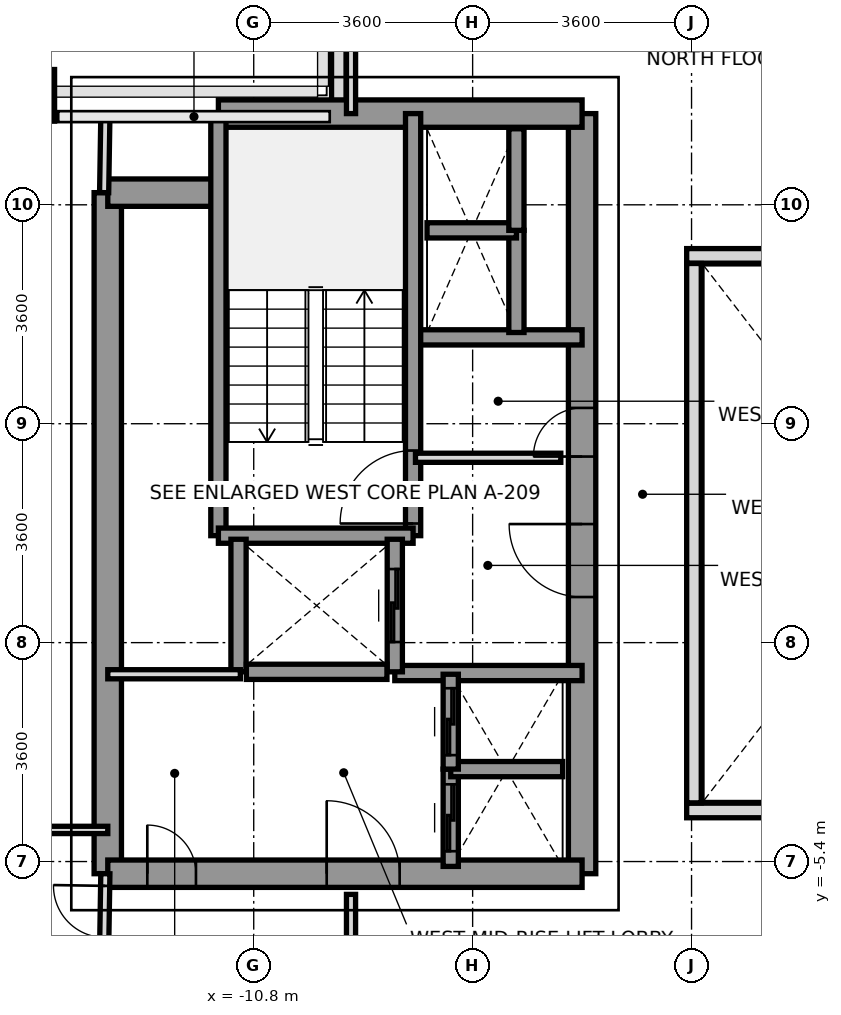
"""IFC4 building model, lengths in metres.
Left out: names, types, materials, properties, quantities, classifications, styles, units other than length and angle.
Written with IfcOpenShell. Run it as: python <this file> out.ifc"""

import sys

from ifc_helpers import new_model, si_unit, direction, frame, frame_2d, origin, origin_2d, place, context, subcontext, project, spatial, rectangle, extrude, source, transform, mapped, element, fill, save


model = new_model("IFC4")
c1 = context("Model", 3, precision=1e-05, world=origin(), true_north=direction((0.0, 1.0)))
c2 = subcontext(c1, "Body", "Model", "MODEL_VIEW")
j1 = project(units=[si_unit("LENGTHUNIT", "METRE"), si_unit("PLANEANGLEUNIT", "RADIAN")], contexts=[c1])
p1 = place(None, origin())
s1 = spatial("IfcSite", under=j1, at=p1, CompositionType="ELEMENT")
p2 = place(p1, origin())
s2 = spatial("IfcBuilding", under=s1, at=p2, CompositionType="ELEMENT")
p3 = place(p2, frame((0.0, 0.0, 144.8)))
s3 = spatial("IfcBuildingStorey", under=s2, at=p3, CompositionType="ELEMENT", Elevation=144.8)
m1 = source(origin(), c2, "Body", "SweptSolid", [
    extrude(rectangle(XDim=0.65, YDim=0.85, at=origin_2d()), origin(), (0.0, 0.0, 1.0), 3.2),
])
p4 = place(p3, frame((-14.4, 7.2, 0.0), z_axis=(0.0, 0.0, 1.0), x_axis=(1.0, 0.0, 0.0)))
e1 = element("IfcColumn", 1, at=p4, inside=s3, PredefinedType="COLUMN", context=c2, shape_type="MappedRepresentation", body=[
    mapped(m1, transform((0.0, 0.0, 0.0), x_axis=(1.0, 0.0, 0.0), y_axis=(0.0, 1.0, 0.0), z_axis=(0.0, 0.0, 1.0), scale=1.0)),
])
p5 = place(p3, frame((-9.4, 6.953, 0.0), z_axis=(0.0, 0.0, 1.0), x_axis=(0.0, 1.0, 0.0)))
e2 = element("IfcWall", 2, at=p5, inside=s3, PredefinedType="PARAPET", context=c2, shape_type="SweptSolid", body=[
    extrude(rectangle(XDim=1.519, YDim=0.24, at=frame_2d((0.76, 0.0))), origin(), (0.0, 0.0, 1.0), 1.15),
])
p6 = place(p3, frame((-13.2, -5.6, 0.0), z_axis=(0.0, 0.0, 1.0), x_axis=(0.0, 1.0, 0.0)))
e3 = element("IfcWall", 3, at=p6, inside=s3, PredefinedType="SHEAR", context=c2, shape_type="SweptSolid", body=[
    extrude(rectangle(XDim=11.2, YDim=0.45, at=frame_2d((5.6, 0.0))), origin(), (0.0, 0.0, 1.0), 3.2),
])
p7 = place(p3, frame((-5.4, -5.6, 0.0), z_axis=(0.0, 0.0, 1.0), x_axis=(0.0, 1.0, 0.0)))
e4 = element("IfcWall", 4, at=p7, inside=s3, PredefinedType="SHEAR", context=c2, shape_type="SweptSolid", body=[
    extrude(rectangle(XDim=12.5, YDim=0.45, at=frame_2d((6.25, 0.0))), origin(), (0.0, 0.0, 1.0), 3.2),
])
p8 = place(p7, frame((4.55, 0.0, 0.0)))
e5 = element("IfcOpeningElement", 5, at=p8, cuts=e4, PredefinedType="OPENING", context=c2, shape_type="SweptSolid", body=[
    extrude(rectangle(XDim=1.2, YDim=2.2, at=frame_2d((0.6, 1.1))), frame((0.0, 0.235, 0.0), z_axis=(0.0, -1.0, 0.0), x_axis=(1.0, 0.0, 0.0)), (0.0, 0.0, 1.0), 0.47),
])
p9 = place(p7, frame((6.86, 0.0, 0.0)))
e6 = element("IfcOpeningElement", 6, at=p9, cuts=e4, PredefinedType="OPENING", context=c2, shape_type="SweptSolid", body=[
    extrude(rectangle(XDim=0.8, YDim=2.1, at=frame_2d((0.4, 1.05))), frame((0.0, 0.235, 0.0), z_axis=(0.0, -1.0, 0.0), x_axis=(1.0, 0.0, 0.0)), (0.0, 0.0, 1.0), 0.47),
])
p10 = place(p3, frame((-11.381, 6.9, 0.0), z_axis=(0.0, 0.0, 1.0), x_axis=(1.0, 0.0, 0.0)))
e7 = element("IfcWall", 7, at=p10, inside=s3, PredefinedType="SHEAR", context=c2, shape_type="SweptSolid", body=[
    extrude(rectangle(XDim=5.981, YDim=0.45, at=frame_2d((2.991, 0.0))), origin(), (0.0, 0.0, 1.0), 3.2),
])
p11 = place(p3, frame((-13.2, 5.6, 0.0), z_axis=(0.0, 0.0, 1.0), x_axis=(1.0, 0.0, 0.0)))
e8 = element("IfcWall", 8, at=p11, inside=s3, PredefinedType="SHEAR", context=c2, shape_type="SweptSolid", body=[
    extrude(rectangle(XDim=1.819, YDim=0.45, at=frame_2d((0.909, 0.0))), origin(), (0.0, 0.0, 1.0), 3.2),
])
p12 = place(p3, frame((-13.2, -5.6, 0.0), z_axis=(0.0, 0.0, 1.0), x_axis=(1.0, 0.0, 0.0)))
e9 = element("IfcWall", 9, at=p12, inside=s3, PredefinedType="SHEAR", context=c2, shape_type="SweptSolid", body=[
    extrude(rectangle(XDim=7.8, YDim=0.45, at=frame_2d((3.9, 0.0))), origin(), (0.0, 0.0, 1.0), 3.2),
])
p13 = place(p12, frame((3.6, 0.0, 0.0)))
e10 = element("IfcOpeningElement", 10, at=p13, cuts=e9, PredefinedType="OPENING", context=c2, shape_type="SweptSolid", body=[
    extrude(rectangle(XDim=1.2, YDim=2.2, at=frame_2d((0.6, 1.1))), frame((0.0, 0.235, 0.0), z_axis=(0.0, -1.0, 0.0), x_axis=(1.0, 0.0, 0.0)), (0.0, 0.0, 1.0), 0.47),
])
p14 = place(p12, frame((0.65, 0.0, 0.0)))
e11 = element("IfcOpeningElement", 11, at=p14, cuts=e9, PredefinedType="OPENING", context=c2, shape_type="SweptSolid", body=[
    extrude(rectangle(XDim=0.8, YDim=2.1, at=frame_2d((0.4, 1.05))), frame((0.0, 0.235, 0.0), z_axis=(0.0, -1.0, 0.0), x_axis=(1.0, 0.0, 0.0)), (0.0, 0.0, 1.0), 0.47),
])
p15 = place(p3, frame((-8.18, 3.22, 0.0), z_axis=(0.0, 0.0, 1.0), x_axis=(1.0, 0.0, 0.0)))
e12 = element("IfcWall", 12, at=p15, inside=s3, PredefinedType="SOLIDWALL", context=c2, shape_type="SweptSolid", body=[
    extrude(rectangle(XDim=2.78, YDim=0.25, at=frame_2d((1.39, 0.0))), origin(), (0.0, 0.0, 1.0), 3.2),
])
p16 = place(p3, frame((-8.48, -2.3, 0.0), z_axis=(0.0, 0.0, 1.0), x_axis=(1.0, 0.0, 0.0)))
e13 = element("IfcWall", 13, at=p16, inside=s3, PredefinedType="SOLIDWALL", context=c2, shape_type="SweptSolid", body=[
    extrude(rectangle(XDim=3.08, YDim=0.25, at=frame_2d((1.54, 0.0))), origin(), (0.0, 0.0, 1.0), 3.2),
])
p17 = place(p3, frame((-8.179, -0.041, 0.0), z_axis=(0.0, 0.0, 1.0), x_axis=(0.0, 1.0, 0.0)))
e14 = element("IfcWall", 14, at=p17, inside=s3, PredefinedType="SOLIDWALL", context=c2, shape_type="SweptSolid", body=[
    extrude(rectangle(XDim=6.941, YDim=0.25, at=frame_2d((3.47, 0.0))), origin(), (0.0, 0.0, 1.0), 3.2),
])
p18 = place(p17, frame((0.2, 0.0, 0.0)))
e15 = element("IfcOpeningElement", 15, at=p18, cuts=e14, PredefinedType="OPENING", context=c2, shape_type="SweptSolid", body=[
    extrude(rectangle(XDim=1.2, YDim=2.2, at=frame_2d((0.6, 1.1))), frame((0.0, 0.135, 0.0), z_axis=(0.0, -1.0, 0.0), x_axis=(1.0, 0.0, 0.0)), (0.0, 0.0, 1.0), 0.27),
])
p19 = place(p3, frame((-11.381, -0.041, 0.0), z_axis=(0.0, 0.0, 1.0), x_axis=(0.0, 1.0, 0.0)))
e16 = element("IfcWall", 16, at=p19, inside=s3, PredefinedType="SOLIDWALL", context=c2, shape_type="SweptSolid", body=[
    extrude(rectangle(XDim=6.941, YDim=0.25, at=frame_2d((3.47, 0.0))), origin(), (0.0, 0.0, 1.0), 3.2),
])
p20 = place(p3, frame((-11.381, -0.041, 0.0), z_axis=(0.0, 0.0, 1.0), x_axis=(1.0, 0.0, 0.0)))
e17 = element("IfcWall", 17, at=p20, inside=s3, PredefinedType="SOLIDWALL", context=c2, shape_type="SweptSolid", body=[
    extrude(rectangle(XDim=3.202, YDim=0.25, at=frame_2d((1.601, 0.0))), origin(), (0.0, 0.0, 1.0), 3.2),
])
p21 = place(p3, frame((-11.05, -2.28, 0.0), z_axis=(0.0, 0.0, 1.0), x_axis=(0.0, 1.0, 0.0)))
e18 = element("IfcWall", 18, at=p21, inside=s3, PredefinedType="SOLIDWALL", context=c2, shape_type="SweptSolid", body=[
    extrude(rectangle(XDim=2.18, YDim=0.25, at=frame_2d((1.09, 0.0))), origin(), (0.0, 0.0, 1.0), 3.2),
])
p22 = place(p3, frame((-8.48, -2.28, 0.0), z_axis=(0.0, 0.0, 1.0), x_axis=(0.0, 1.0, 0.0)))
e19 = element("IfcWall", 19, at=p22, inside=s3, PredefinedType="SOLIDWALL", context=c2, shape_type="SweptSolid", body=[
    extrude(rectangle(XDim=2.18, YDim=0.25, at=frame_2d((1.09, 0.0))), origin(), (0.0, 0.0, 1.0), 3.2),
])
p23 = place(p22, frame((0.49, 0.0, 0.0)))
e20 = element("IfcOpeningElement", 20, at=p23, cuts=e19, PredefinedType="OPENING", context=c2, shape_type="SweptSolid", body=[
    extrude(rectangle(XDim=1.2, YDim=2.2, at=frame_2d((0.6, 1.1))), frame((0.0, 0.135, 0.0), z_axis=(0.0, -1.0, 0.0), x_axis=(1.0, 0.0, 0.0)), (0.0, 0.0, 1.0), 0.27),
])
p24 = place(p3, frame((-10.921, -2.28, 0.0), z_axis=(0.0, 0.0, 1.0), x_axis=(1.0, 0.0, 0.0)))
e21 = element("IfcWall", 21, at=p24, inside=s3, PredefinedType="SOLIDWALL", context=c2, shape_type="SweptSolid", body=[
    extrude(rectangle(XDim=2.312, YDim=0.25, at=frame_2d((1.156, 0.0))), origin(), (0.0, 0.0, 1.0), 3.2),
])
p25 = place(p3, frame((-7.56, -5.48, 0.0), z_axis=(0.0, 0.0, 1.0), x_axis=(0.0, 1.0, 0.0)))
e22 = element("IfcWall", 22, at=p25, inside=s3, PredefinedType="SOLIDWALL", context=c2, shape_type="SweptSolid", body=[
    extrude(rectangle(XDim=1.6, YDim=0.25, at=frame_2d((0.8, 0.0))), origin(), (0.0, 0.0, 1.0), 3.2),
])
p26 = place(p25, frame((0.25, 0.0, 0.0)))
e23 = element("IfcOpeningElement", 23, at=p26, cuts=e22, PredefinedType="OPENING", context=c2, shape_type="SweptSolid", body=[
    extrude(rectangle(XDim=1.1, YDim=2.2, at=frame_2d((0.55, 1.1))), frame((0.0, 0.135, 0.0), z_axis=(0.0, -1.0, 0.0), x_axis=(1.0, 0.0, 0.0)), (0.0, 0.0, 1.0), 0.27),
])
p27 = place(p3, frame((-7.56, -3.88, 0.0), z_axis=(0.0, 0.0, 1.0), x_axis=(1.0, 0.0, 0.0)))
e24 = element("IfcWall", 24, at=p27, inside=s3, PredefinedType="SOLIDWALL", context=c2, shape_type="SweptSolid", body=[
    extrude(rectangle(XDim=1.84, YDim=0.25, at=frame_2d((0.92, 0.0))), origin(), (0.0, 0.0, 1.0), 3.2),
])
p28 = place(p3, frame((-7.56, -3.88, 0.0), z_axis=(0.0, 0.0, 1.0), x_axis=(0.0, 1.0, 0.0)))
e25 = element("IfcWall", 25, at=p28, inside=s3, PredefinedType="SOLIDWALL", context=c2, shape_type="SweptSolid", body=[
    extrude(rectangle(XDim=1.56, YDim=0.25, at=frame_2d((0.78, 0.0))), origin(), (0.0, 0.0, 1.0), 3.2),
])
p29 = place(p28, frame((0.23, 0.0, 0.0)))
e26 = element("IfcOpeningElement", 26, at=p29, cuts=e25, PredefinedType="OPENING", context=c2, shape_type="SweptSolid", body=[
    extrude(rectangle(XDim=1.1, YDim=2.2, at=frame_2d((0.55, 1.1))), frame((0.0, 0.135, 0.0), z_axis=(0.0, -1.0, 0.0), x_axis=(1.0, 0.0, 0.0)), (0.0, 0.0, 1.0), 0.27),
])
p30 = place(p3, frame((-6.48, 3.3, 0.0), z_axis=(0.0, 0.0, 1.0), x_axis=(0.0, 1.0, 0.0)))
e27 = element("IfcWall", 27, at=p30, inside=s3, PredefinedType="SOLIDWALL", context=c2, shape_type="SweptSolid", body=[
    extrude(rectangle(XDim=1.68, YDim=0.25, at=frame_2d((0.84, 0.0))), origin(), (0.0, 0.0, 1.0), 3.2),
])
p31 = place(p3, frame((-7.95, 4.98, 0.0), z_axis=(0.0, 0.0, 1.0), x_axis=(1.0, 0.0, 0.0)))
e28 = element("IfcWall", 28, at=p31, inside=s3, PredefinedType="SOLIDWALL", context=c2, shape_type="SweptSolid", body=[
    extrude(rectangle(XDim=1.47, YDim=0.25, at=frame_2d((0.735, 0.0))), origin(), (0.0, 0.0, 1.0), 3.2),
])
p32 = place(p3, frame((-6.48, 4.98, 0.0), z_axis=(0.0, 0.0, 1.0), x_axis=(0.0, 1.0, 0.0)))
e29 = element("IfcWall", 29, at=p32, inside=s3, PredefinedType="SOLIDWALL", context=c2, shape_type="SweptSolid", body=[
    extrude(rectangle(XDim=1.67, YDim=0.25, at=frame_2d((0.835, 0.0))), origin(), (0.0, 0.0, 1.0), 3.2),
])
p33 = place(p3, frame((-8.14, 1.24, 0.0), z_axis=(0.0, 0.0, 1.0), x_axis=(1.0, 0.0, 0.0)))
e30 = element("IfcWall", 30, at=p33, inside=s3, PredefinedType="PARTITIONING", context=c2, shape_type="SweptSolid", body=[
    extrude(rectangle(XDim=2.39, YDim=0.15, at=frame_2d((1.195, 0.0))), origin(), (0.0, 0.0, 1.0), 2.3),
])
p34 = place(p3, frame((-13.2, -2.32, 0.0), z_axis=(0.0, 0.0, 1.0), x_axis=(1.0, 0.0, 0.0)))
e31 = element("IfcWall", 31, at=p34, inside=s3, PredefinedType="PARTITIONING", context=c2, shape_type="SweptSolid", body=[
    extrude(rectangle(XDim=2.18, YDim=0.15, at=frame_2d((1.09, 0.0))), origin(), (0.0, 0.0, 1.0), 3.2),
])
p35 = place(p3, frame((-9.2, 6.9, 0.0), z_axis=(0.0, 0.0, 1.0), x_axis=(0.0, 1.0, 0.0)))
e32 = element("IfcWall", 32, at=p35, inside=s3, PredefinedType="PARTITIONING", context=c2, shape_type="SweptSolid", body=[
    extrude(rectangle(XDim=8.78, YDim=0.15, at=frame_2d((4.39, 0.0))), origin(), (0.0, 0.0, 1.0), 2.7),
])
p36 = place(p3, frame((-9.2, -15.68, 0.0), z_axis=(0.0, 0.0, 1.0), x_axis=(0.0, 1.0, 0.0)))
e33 = element("IfcWall", 33, at=p36, inside=s3, PredefinedType="PARTITIONING", context=c2, shape_type="SweptSolid", body=[
    extrude(rectangle(XDim=9.74, YDim=0.15, at=frame_2d((4.87, 0.0))), origin(), (0.0, 0.0, 1.0), 2.7),
])
p37 = place(p3, frame((-13.26, 5.6, 0.0), z_axis=(0.0, 0.0, 1.0), x_axis=(0.016013571389, 0.999871774545, 0.0)))
e34 = element("IfcWall", 34, at=p37, inside=s3, PredefinedType="PARTITIONING", context=c2, shape_type="SweptSolid", body=[
    extrude(rectangle(XDim=1.25, YDim=0.15, at=frame_2d((0.625, 0.0))), origin(), (0.0, 0.0, 1.0), 3.2),
])
p38 = place(p3, frame((-13.26, -6.85, 0.0), z_axis=(0.0, 0.0, 1.0), x_axis=(0.016013571389, 0.999871774545, 0.0)))
e35 = element("IfcWall", 35, at=p38, inside=s3, PredefinedType="PARTITIONING", context=c2, shape_type="SweptSolid", body=[
    extrude(rectangle(XDim=1.25, YDim=0.15, at=frame_2d((0.625, 0.0))), origin(), (0.0, 0.0, 1.0), 3.2),
])
p39 = place(p38, frame((0.2, 0.0, 0.0)))
e36 = element("IfcOpeningElement", 36, at=p39, cuts=e35, PredefinedType="OPENING", context=c2, shape_type="SweptSolid", body=[
    extrude(rectangle(XDim=0.85, YDim=2.1, at=frame_2d((0.425, 1.05))), frame((0.0, 0.085, 0.0), z_axis=(0.0, -1.0, 0.0), x_axis=(1.0, 0.0, 0.0)), (0.0, 0.0, 1.0), 0.17),
])
p40 = place(p3, frame((-19.17, -4.88, 0.0), z_axis=(0.0, 0.0, 1.0), x_axis=(1.0, 0.0, 0.0)))
e37 = element("IfcWall", 37, at=p40, inside=s3, PredefinedType="PARTITIONING", context=c2, shape_type="SweptSolid", body=[
    extrude(rectangle(XDim=5.97, YDim=0.12, at=frame_2d((2.985, 0.0))), origin(), (0.0, 0.0, 1.0), 2.76),
])
p41 = place(p40, frame((1.45, 0.0, 0.0)))
e38 = element("IfcOpeningElement", 38, at=p41, cuts=e37, PredefinedType="OPENING", context=c2, shape_type="SweptSolid", body=[
    extrude(rectangle(XDim=0.95, YDim=2.15, at=frame_2d((0.475, 1.075))), frame((0.0, 0.07, 0.0), z_axis=(0.0, -1.0, 0.0), x_axis=(1.0, 0.0, 0.0)), (0.0, 0.0, 1.0), 0.14),
])
for number, where, z_axis, x_axis in (
    (39, (-3.68, -4.56, 0.0), (0.0, 0.0, 1.0), (1.0, 0.0, 0.0)),
    (40, (-3.68, 4.56, 0.0), (0.0, 0.0, 1.0), (1.0, 0.0, 0.0)),
):
    element("IfcWall", number, at=place(p3, frame(where, z_axis=z_axis, x_axis=x_axis)), inside=s3, PredefinedType="PARAPET", context=c2, shape_type="SweptSolid", body=[
        extrude(rectangle(XDim=7.36, YDim=0.24, at=frame_2d((3.68, 0.0))), origin(), (0.0, 0.0, 1.0), 1.15),
    ])
p42 = place(p3, frame((-3.56, -4.435, 0.0), z_axis=(0.0, 0.0, 1.0), x_axis=(0.0, 1.0, 0.0)))
e41 = element("IfcWall", 41, at=p42, inside=s3, PredefinedType="PARAPET", context=c2, shape_type="SweptSolid", body=[
    extrude(rectangle(XDim=8.87, YDim=0.24, at=frame_2d((4.435, 0.0))), origin(), (0.0, 0.0, 1.0), 1.15),
])
m2 = source(origin(), c2, "Body", "SweptSolid", [
    extrude(rectangle(XDim=1.2, YDim=2.2, at=frame_2d((0.6, 1.1))), frame((0.0, 0.025, 0.0), z_axis=(0.0, -1.0, 0.0), x_axis=(1.0, 0.0, 0.0)), (0.0, 0.0, 1.0), 0.05),
])
p43 = place(p18, origin())
e42 = element("IfcDoor", 42, at=p43, inside=s3, OperationType="SINGLE_SWING_LEFT", PredefinedType="DOOR", context=c2, shape_type="MappedRepresentation", body=[
    mapped(m2, transform((0.0, 0.0, 0.0), x_axis=(1.0, 0.0, 0.0), y_axis=(0.0, 1.0, 0.0), z_axis=(0.0, 0.0, 1.0), scale=1.0)),
])
fill(e15, e42)
p44 = place(p8, origin())
e43 = element("IfcDoor", 43, at=p44, inside=s3, OperationType="SINGLE_SWING_RIGHT", PredefinedType="DOOR", context=c2, shape_type="MappedRepresentation", body=[
    mapped(m2, transform((0.0, 0.0, 0.0), x_axis=(1.0, 0.0, 0.0), y_axis=(0.0, 1.0, 0.0), z_axis=(0.0, 0.0, 1.0), scale=1.0)),
])
fill(e5, e43)
p45 = place(p13, origin())
e44 = element("IfcDoor", 44, at=p45, inside=s3, OperationType="SINGLE_SWING_LEFT", PredefinedType="DOOR", context=c2, shape_type="MappedRepresentation", body=[
    mapped(m2, transform((0.0, 0.0, 0.0), x_axis=(1.0, 0.0, 0.0), y_axis=(0.0, 1.0, 0.0), z_axis=(0.0, 0.0, 1.0), scale=1.0)),
])
fill(e10, e44)
m3 = source(origin(), c2, "Body", "SweptSolid", [
    extrude(rectangle(XDim=0.8, YDim=2.1, at=frame_2d((0.4, 1.05))), frame((0.0, 0.025, 0.0), z_axis=(0.0, -1.0, 0.0), x_axis=(1.0, 0.0, 0.0)), (0.0, 0.0, 1.0), 0.05),
])
p46 = place(p9, origin())
e45 = element("IfcDoor", 45, at=p46, inside=s3, OperationType="SINGLE_SWING_LEFT", PredefinedType="DOOR", context=c2, shape_type="MappedRepresentation", body=[
    mapped(m3, transform((0.0, 0.0, 0.0), x_axis=(1.0, 0.0, 0.0), y_axis=(0.0, 1.0, 0.0), z_axis=(0.0, 0.0, 1.0), scale=1.0)),
])
fill(e6, e45)
p47 = place(p14, origin())
e46 = element("IfcDoor", 46, at=p47, inside=s3, OperationType="SINGLE_SWING_LEFT", PredefinedType="DOOR", context=c2, shape_type="MappedRepresentation", body=[
    mapped(m3, transform((0.0, 0.0, 0.0), x_axis=(1.0, 0.0, 0.0), y_axis=(0.0, 1.0, 0.0), z_axis=(0.0, 0.0, 1.0), scale=1.0)),
])
fill(e11, e46)
p48 = place(p23, origin())
e47 = element("IfcDoor", 47, at=p48, inside=s3, OperationType="SLIDING_TO_RIGHT", PredefinedType="DOOR", context=c2, shape_type="MappedRepresentation", body=[
    mapped(m2, transform((0.0, 0.0, 0.0), x_axis=(1.0, 0.0, 0.0), y_axis=(0.0, 1.0, 0.0), z_axis=(0.0, 0.0, 1.0), scale=1.0)),
])
fill(e20, e47)
m4 = source(origin(), c2, "Body", "SweptSolid", [
    extrude(rectangle(XDim=1.1, YDim=2.2, at=frame_2d((0.55, 1.1))), frame((0.0, 0.025, 0.0), z_axis=(0.0, -1.0, 0.0), x_axis=(1.0, 0.0, 0.0)), (0.0, 0.0, 1.0), 0.05),
])
p49 = place(p26, origin())
e48 = element("IfcDoor", 48, at=p49, inside=s3, OperationType="SLIDING_TO_LEFT", PredefinedType="DOOR", context=c2, shape_type="MappedRepresentation", body=[
    mapped(m4, transform((0.0, 0.0, 0.0), x_axis=(1.0, 0.0, 0.0), y_axis=(0.0, 1.0, 0.0), z_axis=(0.0, 0.0, 1.0), scale=1.0)),
])
fill(e23, e48)
p50 = place(p29, origin())
e49 = element("IfcDoor", 49, at=p50, inside=s3, OperationType="SLIDING_TO_LEFT", PredefinedType="DOOR", context=c2, shape_type="MappedRepresentation", body=[
    mapped(m4, transform((0.0, 0.0, 0.0), x_axis=(1.0, 0.0, 0.0), y_axis=(0.0, 1.0, 0.0), z_axis=(0.0, 0.0, 1.0), scale=1.0)),
])
fill(e26, e49)
m5 = source(origin(), c2, "Body", "SweptSolid", [
    extrude(rectangle(XDim=0.85, YDim=2.1, at=frame_2d((0.425, 1.05))), frame((0.0, 0.025, 0.0), z_axis=(0.0, -1.0, 0.0), x_axis=(1.0, 0.0, 0.0)), (0.0, 0.0, 1.0), 0.05),
])
p51 = place(p39, origin())
e50 = element("IfcDoor", 50, at=p51, inside=s3, OperationType="SINGLE_SWING_RIGHT", PredefinedType="DOOR", context=c2, shape_type="MappedRepresentation", body=[
    mapped(m5, transform((0.0, 0.0, 0.0), x_axis=(1.0, 0.0, 0.0), y_axis=(0.0, 1.0, 0.0), z_axis=(0.0, 0.0, 1.0), scale=1.0)),
])
fill(e36, e50)
save(model, sys.argv[1])
